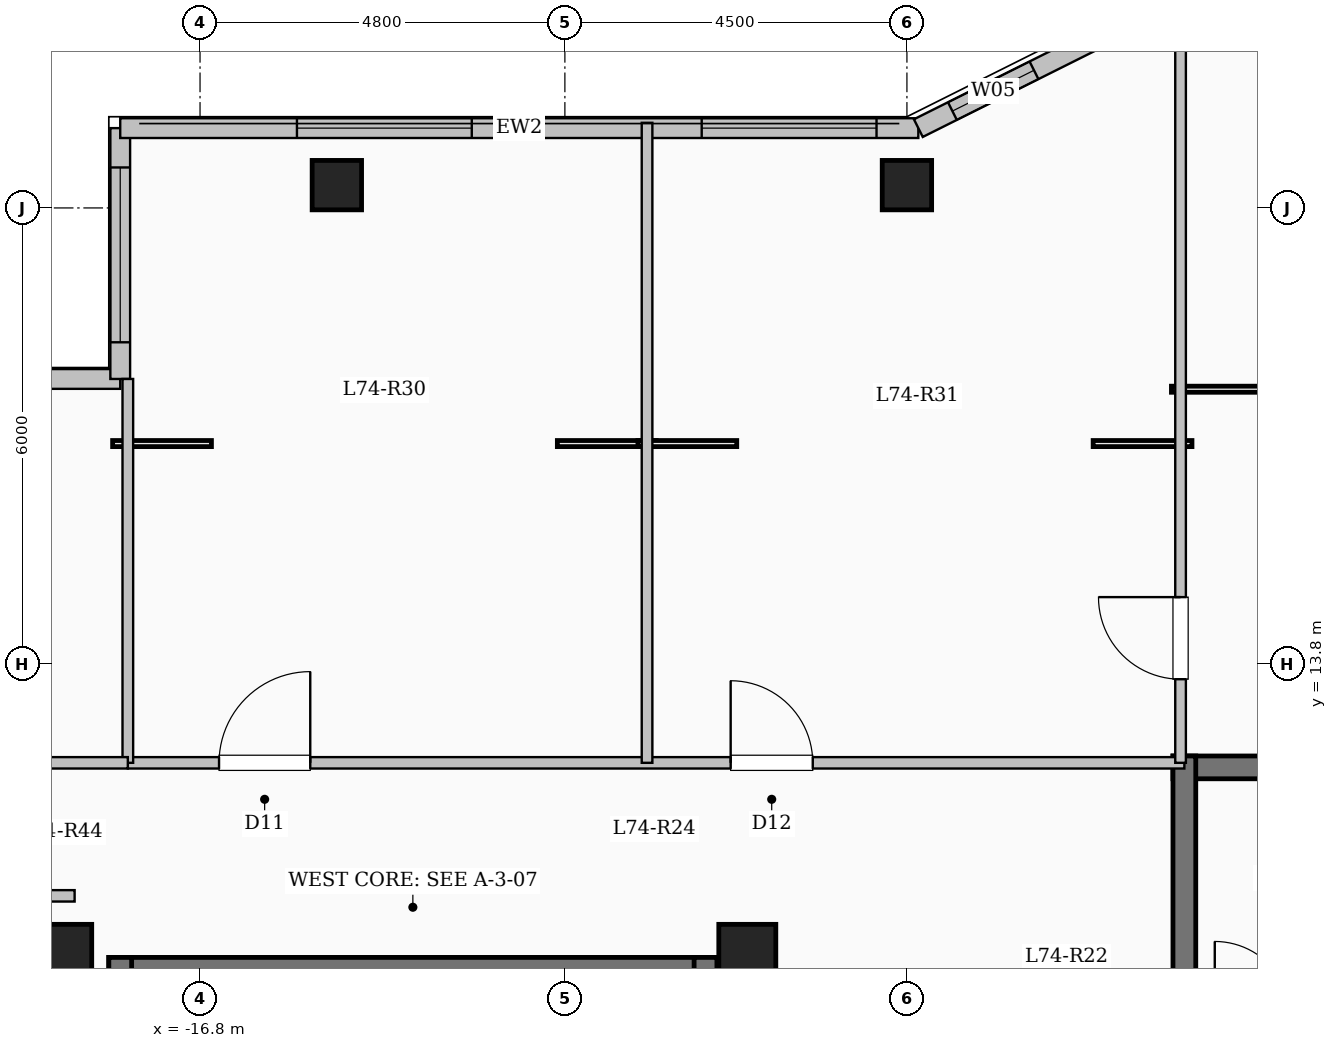
"""IFC4 building model, lengths in metres.
Left out: names, types, materials, properties, quantities, classifications, styles, units other than length and angle.
Written with IfcOpenShell. Run it as: python <this file> out.ifc"""

import sys

from ifc_helpers import new_model, si_unit, direction, frame, frame_2d, origin, origin_2d, place, context, subcontext, project, spatial, rectangle, extrude, element, fill, save


model = new_model("IFC4")
c1 = context("Model", 3, precision=1e-05, world=origin(), true_north=direction((0.0, 1.0)))
c2 = subcontext(c1, "Body", "Model", "MODEL_VIEW")
j1 = project(units=[si_unit("LENGTHUNIT", "METRE"), si_unit("PLANEANGLEUNIT", "RADIAN")], contexts=[c1])
p1 = place(None, origin())
s1 = spatial("IfcSite", under=j1, at=p1, CompositionType="ELEMENT")
p2 = place(p1, origin())
s2 = spatial("IfcBuilding", under=s1, at=p2, CompositionType="ELEMENT")
p3 = place(p2, frame((0.0, 0.0, 271.65)))
s3 = spatial("IfcBuildingStorey", under=s2, at=p3, CompositionType="ELEMENT", Elevation=271.65)
for number, where, z_axis, x_axis in (
    (1, (-9.6, 10.0, 0.0), (0.0, 0.0, 1.0), (1.0, 0.0, 0.0)),
    (2, (-18.6, 10.0, 0.0), (0.0, 0.0, 1.0), (1.0, 0.0, 0.0)),
):
    element("IfcColumn", number, at=place(p3, frame(where, z_axis=z_axis, x_axis=x_axis)), inside=s3, PredefinedType="COLUMN", context=c2, shape_type="SweptSolid", body=[
        extrude(rectangle(XDim=0.75, YDim=0.75, at=origin_2d()), origin(), (0.0, 0.0, 1.0), 4.65),
    ])
for number, where, z_axis, x_axis in (
    (3, (-15.0, 20.1, 0.0), (0.0, 0.0, 1.0), (1.0, 0.0, 0.0)),
    (4, (-7.5, 20.1, 0.0), (0.0, 0.0, 1.0), (1.0, 0.0, 0.0)),
):
    element("IfcColumn", number, at=place(p3, frame(where, z_axis=z_axis, x_axis=x_axis)), inside=s3, PredefinedType="COLUMN", context=c2, shape_type="SweptSolid", body=[
        extrude(rectangle(XDim=0.65, YDim=0.65, at=origin_2d()), origin(), (0.0, 0.0, 1.0), 4.65),
    ])
p4 = place(p3, frame((-22.65, 17.55, 0.0), z_axis=(0.0, 0.0, 1.0), x_axis=(1.0, 0.0, 0.0)))
e5 = element("IfcWall", 5, at=p4, inside=s3, PredefinedType="SOLIDWALL", context=c2, shape_type="SweptSolid", body=[
    extrude(rectangle(XDim=4.8, YDim=0.26, at=frame_2d((2.4, 0.0))), origin(), (0.0, 0.0, 1.0), 4.35),
])
p5 = place(p4, frame((1.275, 0.0, 0.85)))
e6 = element("IfcOpeningElement", 6, at=p5, cuts=e5, PredefinedType="OPENING", context=c2, shape_type="SweptSolid", body=[
    extrude(rectangle(XDim=2.3, YDim=2.2, at=frame_2d((1.15, 1.1))), frame((0.0, 0.14, 0.0), z_axis=(0.0, -1.0, 0.0), x_axis=(1.0, 0.0, 0.0)), (0.0, 0.0, 1.0), 0.28),
])
p6 = place(p3, frame((-17.85, 17.55, 0.0), z_axis=(0.0, 0.0, 1.0), x_axis=(0.0, 1.0, 0.0)))
e7 = element("IfcWall", 7, at=p6, inside=s3, PredefinedType="SOLIDWALL", context=c2, shape_type="SweptSolid", body=[
    extrude(rectangle(XDim=3.3, YDim=0.26, at=frame_2d((1.65, 0.0))), origin(), (0.0, 0.0, 1.0), 4.35),
])
p7 = place(p6, frame((0.482, 0.0, 0.85)))
e8 = element("IfcOpeningElement", 8, at=p7, cuts=e7, PredefinedType="OPENING", context=c2, shape_type="SweptSolid", body=[
    extrude(rectangle(XDim=2.3, YDim=2.2, at=frame_2d((1.15, 1.1))), frame((0.0, 0.14, 0.0), z_axis=(0.0, -1.0, 0.0), x_axis=(1.0, 0.0, 0.0)), (0.0, 0.0, 1.0), 0.28),
])
p8 = place(p3, frame((-17.85, 20.85, 0.0), z_axis=(0.0, 0.0, 1.0), x_axis=(1.0, 0.0, 0.0)))
e9 = element("IfcWall", 9, at=p8, inside=s3, PredefinedType="SOLIDWALL", context=c2, shape_type="SweptSolid", body=[
    extrude(rectangle(XDim=10.5, YDim=0.26, at=frame_2d((5.25, 0.0))), origin(), (0.0, 0.0, 1.0), 4.35),
])
p9 = place(p8, frame((2.325, 0.0, 0.85)))
e10 = element("IfcOpeningElement", 10, at=p9, cuts=e9, PredefinedType="OPENING", context=c2, shape_type="SweptSolid", body=[
    extrude(rectangle(XDim=2.3, YDim=2.2, at=frame_2d((1.15, 1.1))), frame((0.0, 0.14, 0.0), z_axis=(0.0, -1.0, 0.0), x_axis=(1.0, 0.0, 0.0)), (0.0, 0.0, 1.0), 0.28),
])
p10 = place(p8, frame((7.65, 0.0, 0.85)))
e11 = element("IfcOpeningElement", 11, at=p10, cuts=e9, PredefinedType="OPENING", context=c2, shape_type="SweptSolid", body=[
    extrude(rectangle(XDim=2.3, YDim=2.2, at=frame_2d((1.15, 1.1))), frame((0.0, 0.14, 0.0), z_axis=(0.0, -1.0, 0.0), x_axis=(1.0, 0.0, 0.0)), (0.0, 0.0, 1.0), 0.28),
])
p11 = place(p3, frame((-7.35, 20.85, 0.0), z_axis=(0.0, 0.0, 1.0), x_axis=(0.894427191, 0.4472135955, 0.0)))
e12 = element("IfcWall", 12, at=p11, inside=s3, PredefinedType="SOLIDWALL", context=c2, shape_type="SweptSolid", body=[
    extrude(rectangle(XDim=3.354, YDim=0.26, at=frame_2d((1.677, 0.0))), origin(), (0.0, 0.0, 1.0), 4.35),
])
p12 = place(p11, frame((0.501, 0.0, 0.95)))
e13 = element("IfcOpeningElement", 13, at=p12, cuts=e12, PredefinedType="OPENING", context=c2, shape_type="SweptSolid", body=[
    extrude(rectangle(XDim=1.2, YDim=1.5, at=frame_2d((0.6, 0.75))), frame((0.0, 0.14, 0.0), z_axis=(0.0, -1.0, 0.0), x_axis=(1.0, 0.0, 0.0)), (0.0, 0.0, 1.0), 0.28),
])
p13 = place(p3, frame((-18.0, 9.79, 0.0), z_axis=(0.0, 0.0, 1.0), x_axis=(1.0, 0.0, 0.0)))
e14 = element("IfcWall", 14, at=p13, inside=s3, PredefinedType="SHEAR", context=c2, shape_type="SweptSolid", body=[
    extrude(rectangle(XDim=8.0, YDim=0.3, at=frame_2d((4.0, 0.0))), origin(), (0.0, 0.0, 1.0), 4.65),
])
for number, where, z_axis, x_axis in (
    (15, (-17.85, 6.35, 0.0), (0.0, 0.0, 1.0), (0.0, 1.0, 0.0)),
    (16, (-10.15, 6.35, 0.0), (0.0, 0.0, 1.0), (0.0, 1.0, 0.0)),
):
    element("IfcWall", number, at=place(p3, frame(where, z_axis=z_axis, x_axis=x_axis)), inside=s3, PredefinedType="SHEAR", context=c2, shape_type="SweptSolid", body=[
        extrude(rectangle(XDim=3.59, YDim=0.3, at=frame_2d((1.795, 0.0))), origin(), (0.0, 0.0, 1.0), 4.65),
    ])
p14 = place(p3, frame((-4.0, 12.44, 0.0), z_axis=(0.0, 0.0, 1.0), x_axis=(1.0, 0.0, 0.0)))
e17 = element("IfcWall", 17, at=p14, inside=s3, PredefinedType="SHEAR", context=c2, shape_type="SweptSolid", body=[
    extrude(rectangle(XDim=8.0, YDim=0.3, at=frame_2d((4.0, 0.0))), origin(), (0.0, 0.0, 1.0), 4.65),
])
p15 = place(p3, frame((-3.85, 9.0, 0.0), z_axis=(0.0, 0.0, 1.0), x_axis=(0.0, 1.0, 0.0)))
e18 = element("IfcWall", 18, at=p15, inside=s3, PredefinedType="SHEAR", context=c2, shape_type="SweptSolid", body=[
    extrude(rectangle(XDim=3.59, YDim=0.3, at=frame_2d((1.795, 0.0))), origin(), (0.0, 0.0, 1.0), 4.65),
])
p16 = place(p3, frame((-17.75, 12.5, 0.0), z_axis=(0.0, 0.0, 1.0), x_axis=(1.0, 0.0, 0.0)))
e19 = element("IfcWall", 19, at=p16, inside=s3, PredefinedType="PARTITIONING", context=c2, shape_type="SweptSolid", body=[
    extrude(rectangle(XDim=13.9, YDim=0.15, at=frame_2d((6.95, 0.0))), origin(), (0.0, 0.0, 1.0), 4.35),
])
p17 = place(p16, frame((1.2, 0.0, 0.0)))
e20 = element("IfcOpeningElement", 20, at=p17, cuts=e19, PredefinedType="OPENING", context=c2, shape_type="SweptSolid", body=[
    extrude(rectangle(XDim=1.2, YDim=2.15, at=frame_2d((0.6, 1.075))), frame((0.0, 0.085, 0.0), z_axis=(0.0, -1.0, 0.0), x_axis=(1.0, 0.0, 0.0)), (0.0, 0.0, 1.0), 0.17),
])
p18 = place(p16, frame((7.931, 0.0, 0.0)))
e21 = element("IfcOpeningElement", 21, at=p18, cuts=e19, PredefinedType="OPENING", context=c2, shape_type="SweptSolid", body=[
    extrude(rectangle(XDim=1.08, YDim=2.15, at=frame_2d((0.54, 1.075))), frame((0.0, 0.085, 0.0), z_axis=(0.0, -1.0, 0.0), x_axis=(1.0, 0.0, 0.0)), (0.0, 0.0, 1.0), 0.17),
])
p19 = place(p3, frame((-3.9, 12.5, 0.0), z_axis=(0.0, 0.0, 1.0), x_axis=(0.0, 1.0, 0.0)))
e22 = element("IfcWall", 22, at=p19, inside=s3, PredefinedType="PARTITIONING", context=c2, shape_type="SweptSolid", body=[
    extrude(rectangle(XDim=9.88, YDim=0.14, at=frame_2d((4.94, 0.0))), origin(), (0.0, 0.0, 1.0), 4.35),
])
p20 = place(p19, frame((1.1, 0.0, 0.0)))
e23 = element("IfcOpeningElement", 23, at=p20, cuts=e22, PredefinedType="OPENING", context=c2, shape_type="SweptSolid", body=[
    extrude(rectangle(XDim=1.08, YDim=2.15, at=frame_2d((0.54, 1.075))), frame((0.0, 0.08, 0.0), z_axis=(0.0, -1.0, 0.0), x_axis=(1.0, 0.0, 0.0)), (0.0, 0.0, 1.0), 0.16),
])
p21 = place(p3, frame((-10.919, 12.5, 0.0), z_axis=(0.0, 0.0, 1.0), x_axis=(0.0, 1.0, 0.0)))
e24 = element("IfcWall", 24, at=p21, inside=s3, PredefinedType="PARTITIONING", context=c2, shape_type="SweptSolid", body=[
    extrude(rectangle(XDim=8.42, YDim=0.14, at=frame_2d((4.21, 0.0))), origin(), (0.0, 0.0, 1.0), 4.35),
])
p22 = place(p3, frame((-22.68, 10.75, 0.0), z_axis=(0.0, 0.0, 1.0), x_axis=(1.0, 0.0, 0.0)))
e25 = element("IfcWall", 25, at=p22, inside=s3, PredefinedType="PARTITIONING", context=c2, shape_type="SweptSolid", body=[
    extrude(rectangle(XDim=4.23, YDim=0.15, at=frame_2d((2.115, 0.0))), origin(), (0.0, 0.0, 1.0), 4.35),
])
p23 = place(p3, frame((-17.75, 12.5, 0.0), z_axis=(0.0, 0.0, 1.0), x_axis=(0.0, 1.0, 0.0)))
e26 = element("IfcWall", 26, at=p23, inside=s3, PredefinedType="PARTITIONING", context=c2, shape_type="SweptSolid", body=[
    extrude(rectangle(XDim=5.05, YDim=0.14, at=frame_2d((2.525, 0.0))), origin(), (0.0, 0.0, 1.0), 4.35),
])
p24 = place(p3, frame((-22.68, 12.5, 0.0), z_axis=(0.0, 0.0, 1.0), x_axis=(1.0, 0.0, 0.0)))
e27 = element("IfcWall", 27, at=p24, inside=s3, PredefinedType="PARTITIONING", context=c2, shape_type="SweptSolid", body=[
    extrude(rectangle(XDim=4.93, YDim=0.15, at=frame_2d((2.465, 0.0))), origin(), (0.0, 0.0, 1.0), 4.35),
])
p25 = place(p24, frame((1.99, 0.0, 0.0)))
e28 = element("IfcOpeningElement", 28, at=p25, cuts=e27, PredefinedType="OPENING", context=c2, shape_type="SweptSolid", body=[
    extrude(rectangle(XDim=0.95, YDim=2.15, at=frame_2d((0.475, 1.075))), frame((0.0, 0.085, 0.0), z_axis=(0.0, -1.0, 0.0), x_axis=(1.0, 0.0, 0.0)), (0.0, 0.0, 1.0), 0.17),
])
p26 = place(p7, origin())
e29 = element("IfcWindow", 29, at=p26, inside=s3, PartitioningType="SINGLE_PANEL", PredefinedType="WINDOW", context=c2, shape_type="SweptSolid", body=[
    extrude(rectangle(XDim=2.3, YDim=2.2, at=frame_2d((1.15, 1.1))), frame((0.0, 0.03, 0.0), z_axis=(0.0, -1.0, 0.0), x_axis=(1.0, 0.0, 0.0)), (0.0, 0.0, 1.0), 0.06),
])
fill(e8, e29)
p27 = place(p9, origin())
e30 = element("IfcWindow", 30, at=p27, inside=s3, PartitioningType="SINGLE_PANEL", PredefinedType="WINDOW", context=c2, shape_type="SweptSolid", body=[
    extrude(rectangle(XDim=2.3, YDim=2.2, at=frame_2d((1.15, 1.1))), frame((0.0, 0.03, 0.0), z_axis=(0.0, -1.0, 0.0), x_axis=(1.0, 0.0, 0.0)), (0.0, 0.0, 1.0), 0.06),
])
fill(e10, e30)
p28 = place(p10, origin())
e31 = element("IfcWindow", 31, at=p28, inside=s3, PartitioningType="SINGLE_PANEL", PredefinedType="WINDOW", context=c2, shape_type="SweptSolid", body=[
    extrude(rectangle(XDim=2.3, YDim=2.2, at=frame_2d((1.15, 1.1))), frame((0.0, 0.03, 0.0), z_axis=(0.0, -1.0, 0.0), x_axis=(1.0, 0.0, 0.0)), (0.0, 0.0, 1.0), 0.06),
])
fill(e11, e31)
p29 = place(p12, origin())
e32 = element("IfcWindow", 32, at=p29, inside=s3, PartitioningType="SINGLE_PANEL", PredefinedType="WINDOW", context=c2, shape_type="SweptSolid", body=[
    extrude(rectangle(XDim=1.2, YDim=1.5, at=frame_2d((0.6, 0.75))), frame((0.0, 0.03, 0.0), z_axis=(0.0, -1.0, 0.0), x_axis=(1.0, 0.0, 0.0)), (0.0, 0.0, 1.0), 0.06),
])
fill(e13, e32)
p30 = place(p17, origin())
e33 = element("IfcDoor", 33, at=p30, inside=s3, OperationType="SINGLE_SWING_RIGHT", PredefinedType="DOOR", context=c2, shape_type="SweptSolid", body=[
    extrude(rectangle(XDim=1.2, YDim=2.15, at=frame_2d((0.6, 1.075))), frame((0.0, 0.025, 0.0), z_axis=(0.0, -1.0, 0.0), x_axis=(1.0, 0.0, 0.0)), (0.0, 0.0, 1.0), 0.05),
])
fill(e20, e33)
p31 = place(p18, origin())
e34 = element("IfcDoor", 34, at=p31, inside=s3, OperationType="SINGLE_SWING_LEFT", PredefinedType="DOOR", context=c2, shape_type="SweptSolid", body=[
    extrude(rectangle(XDim=1.08, YDim=2.15, at=frame_2d((0.54, 1.075))), frame((0.0, 0.025, 0.0), z_axis=(0.0, -1.0, 0.0), x_axis=(1.0, 0.0, 0.0)), (0.0, 0.0, 1.0), 0.05),
])
fill(e21, e34)
p32 = place(p20, origin())
e35 = element("IfcDoor", 35, at=p32, inside=s3, OperationType="SINGLE_SWING_RIGHT", PredefinedType="DOOR", context=c2, shape_type="SweptSolid", body=[
    extrude(rectangle(XDim=1.08, YDim=2.15, at=frame_2d((0.54, 1.075))), frame((0.0, 0.025, 0.0), z_axis=(0.0, -1.0, 0.0), x_axis=(1.0, 0.0, 0.0)), (0.0, 0.0, 1.0), 0.05),
])
fill(e23, e35)
save(model, sys.argv[1])
